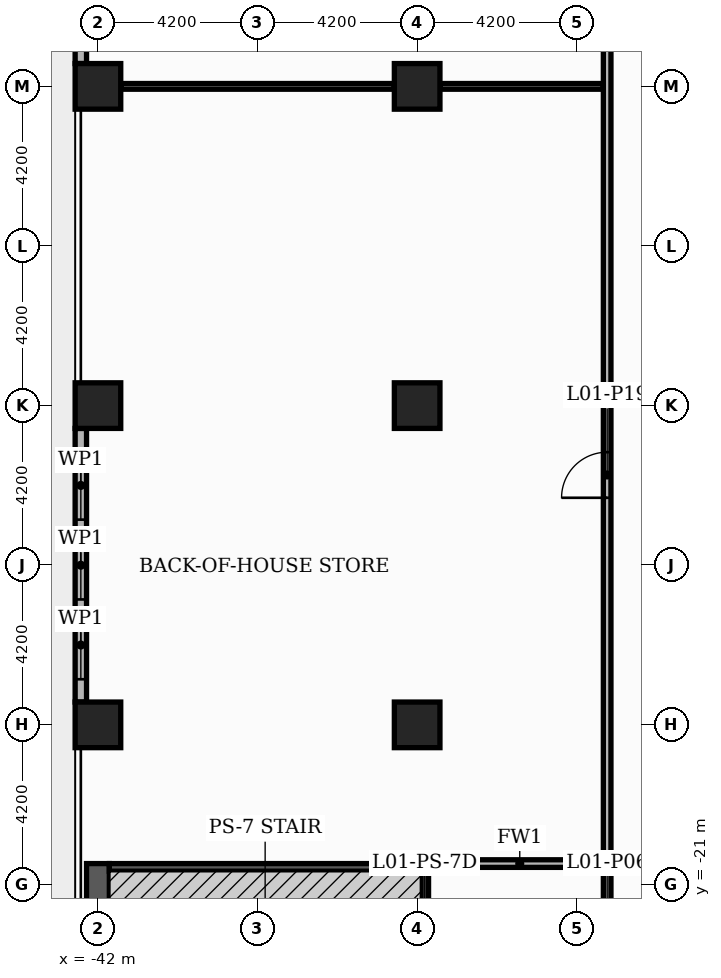
"""IFC4 building model, lengths in metres.
Left out: names, types, materials, properties, quantities, classifications, styles, units other than length and angle.
Written with IfcOpenShell. Run it as: python <this file> out.ifc"""

import sys

from ifc_helpers import new_model, si_unit, direction, frame, frame_2d, origin, origin_2d, place, context, subcontext, project, spatial, rectangle, extrude, element, fill, save


model = new_model("IFC4")
c1 = context("Model", 3, precision=1e-05, world=origin(), true_north=direction((0.0, 1.0)))
c2 = subcontext(c1, "Body", "Model", "MODEL_VIEW")
j1 = project(units=[si_unit("LENGTHUNIT", "METRE"), si_unit("PLANEANGLEUNIT", "RADIAN")], contexts=[c1])
p1 = place(None, origin())
s1 = spatial("IfcSite", under=j1, at=p1, CompositionType="ELEMENT")
p2 = place(p1, origin())
s2 = spatial("IfcBuilding", under=s1, at=p2, CompositionType="ELEMENT")
p3 = place(p2, frame((0.0, 0.0, 7.2)))
s3 = spatial("IfcBuildingStorey", under=s2, at=p3, CompositionType="ELEMENT", Elevation=7.2)
for number, where, z_axis, x_axis in (
    (1, (-33.6, 0.0, 0.0), (0.0, 0.0, 1.0), (1.0, 0.0, 0.0)),
    (2, (-33.6, -8.4, 0.0), (0.0, 0.0, 1.0), (1.0, 0.0, 0.0)),
    (3, (-33.6, -16.8, 0.0), (0.0, 0.0, 1.0), (1.0, 0.0, 0.0)),
    (4, (-42.0, 0.0, 0.0), (0.0, 0.0, 1.0), (1.0, 0.0, 0.0)),
    (5, (-42.0, -8.4, 0.0), (0.0, 0.0, 1.0), (1.0, 0.0, 0.0)),
    (6, (-42.0, -16.8, 0.0), (0.0, 0.0, 1.0), (1.0, 0.0, 0.0)),
):
    element("IfcColumn", number, at=place(p3, frame(where, z_axis=z_axis, x_axis=x_axis)), inside=s3, PredefinedType="COLUMN", context=c2, shape_type="SweptSolid", body=[
        extrude(rectangle(XDim=1.2, YDim=1.2, at=origin_2d()), origin(), (0.0, 0.0, 1.0), 4.8),
    ])
p4 = place(p3, frame((-42.45, 7.8, 0.0), z_axis=(0.0, 0.0, 1.0), x_axis=(0.0, -1.0, 0.0)))
e7 = element("IfcWall", 7, at=p4, inside=s3, PredefinedType="STANDARD", context=c2, shape_type="SweptSolid", body=[
    extrude(rectangle(XDim=7.2, YDim=0.3, at=frame_2d((3.6, 0.0))), origin(), (0.0, 0.0, 1.0), 4.38),
])
p5 = place(p4, frame((0.6, 0.0, 0.6)))
e8 = element("IfcOpeningElement", 8, at=p5, cuts=e7, PredefinedType="OPENING", context=c2, shape_type="SweptSolid", body=[
    extrude(rectangle(XDim=1.8, YDim=3.0, at=frame_2d((0.9, 1.5))), frame((0.0, 0.16, 0.0), z_axis=(0.0, -1.0, 0.0), x_axis=(1.0, 0.0, 0.0)), (0.0, 0.0, 1.0), 0.32),
])
p6 = place(p4, frame((2.7, 0.0, 0.6)))
e9 = element("IfcOpeningElement", 9, at=p6, cuts=e7, PredefinedType="OPENING", context=c2, shape_type="SweptSolid", body=[
    extrude(rectangle(XDim=1.8, YDim=3.0, at=frame_2d((0.9, 1.5))), frame((0.0, 0.16, 0.0), z_axis=(0.0, -1.0, 0.0), x_axis=(1.0, 0.0, 0.0)), (0.0, 0.0, 1.0), 0.32),
])
p7 = place(p4, frame((4.8, 0.0, 0.6)))
e10 = element("IfcOpeningElement", 10, at=p7, cuts=e7, PredefinedType="OPENING", context=c2, shape_type="SweptSolid", body=[
    extrude(rectangle(XDim=1.8, YDim=3.0, at=frame_2d((0.9, 1.5))), frame((0.0, 0.16, 0.0), z_axis=(0.0, -1.0, 0.0), x_axis=(1.0, 0.0, 0.0)), (0.0, 0.0, 1.0), 0.32),
])
p8 = place(p3, frame((-42.45, -9.0, 0.0), z_axis=(0.0, 0.0, 1.0), x_axis=(0.0, -1.0, 0.0)))
e11 = element("IfcWall", 11, at=p8, inside=s3, PredefinedType="STANDARD", context=c2, shape_type="SweptSolid", body=[
    extrude(rectangle(XDim=7.2, YDim=0.3, at=frame_2d((3.6, 0.0))), origin(), (0.0, 0.0, 1.0), 4.38),
])
p9 = place(p8, frame((0.6, 0.0, 0.6)))
e12 = element("IfcOpeningElement", 12, at=p9, cuts=e11, PredefinedType="OPENING", context=c2, shape_type="SweptSolid", body=[
    extrude(rectangle(XDim=1.8, YDim=3.0, at=frame_2d((0.9, 1.5))), frame((0.0, 0.16, 0.0), z_axis=(0.0, -1.0, 0.0), x_axis=(1.0, 0.0, 0.0)), (0.0, 0.0, 1.0), 0.32),
])
p10 = place(p8, frame((2.7, 0.0, 0.6)))
e13 = element("IfcOpeningElement", 13, at=p10, cuts=e11, PredefinedType="OPENING", context=c2, shape_type="SweptSolid", body=[
    extrude(rectangle(XDim=1.8, YDim=3.0, at=frame_2d((0.9, 1.5))), frame((0.0, 0.16, 0.0), z_axis=(0.0, -1.0, 0.0), x_axis=(1.0, 0.0, 0.0)), (0.0, 0.0, 1.0), 0.32),
])
p11 = place(p8, frame((4.8, 0.0, 0.6)))
e14 = element("IfcOpeningElement", 14, at=p11, cuts=e11, PredefinedType="OPENING", context=c2, shape_type="SweptSolid", body=[
    extrude(rectangle(XDim=1.8, YDim=3.0, at=frame_2d((0.9, 1.5))), frame((0.0, 0.16, 0.0), z_axis=(0.0, -1.0, 0.0), x_axis=(1.0, 0.0, 0.0)), (0.0, 0.0, 1.0), 0.32),
])
p12 = place(p3, frame((-33.3, -20.45, 0.0), z_axis=(0.0, 0.0, 1.0), x_axis=(1.0, 0.0, 0.0)))
e15 = element("IfcWall", 15, at=p12, inside=s3, PredefinedType="PARTITIONING", context=c2, shape_type="SweptSolid", body=[
    extrude(rectangle(XDim=4.8, YDim=0.2, at=frame_2d((2.4, 0.0))), origin(), (0.0, 0.0, 1.0), 4.38),
])
p13 = place(p3, frame((-41.4, 0.0, 0.0), z_axis=(0.0, 0.0, 1.0), x_axis=(1.0, 0.0, 0.0)))
e16 = element("IfcWall", 16, at=p13, inside=s3, PredefinedType="PARTITIONING", context=c2, shape_type="SweptSolid", body=[
    extrude(rectangle(XDim=7.2, YDim=0.15, at=frame_2d((3.6, 0.0))), origin(), (0.0, 0.0, 1.0), 4.08),
])
p14 = place(p3, frame((-33.0, 0.0, 0.0), z_axis=(0.0, 0.0, 1.0), x_axis=(1.0, 0.0, 0.0)))
e17 = element("IfcWall", 17, at=p14, inside=s3, PredefinedType="PARTITIONING", context=c2, shape_type="SweptSolid", body=[
    extrude(rectangle(XDim=4.3, YDim=0.15, at=frame_2d((2.15, 0.0))), origin(), (0.0, 0.0, 1.0), 4.08),
])
p15 = place(p3, frame((-28.6, -24.5, 0.0), z_axis=(0.0, 0.0, 1.0), x_axis=(0.0, 1.0, 0.0)))
e18 = element("IfcWall", 18, at=p15, inside=s3, PredefinedType="PARTITIONING", context=c2, shape_type="SweptSolid", body=[
    extrude(rectangle(XDim=3.95, YDim=0.2, at=frame_2d((1.975, 0.0))), origin(), (0.0, 0.0, 1.0), 4.38),
])
p16 = place(p15, frame((1.375, 0.0, 0.0)))
e19 = element("IfcOpeningElement", 19, at=p16, cuts=e18, PredefinedType="OPENING", context=c2, shape_type="SweptSolid", body=[
    extrude(rectangle(XDim=1.2, YDim=2.2, at=frame_2d((0.6, 1.1))), frame((0.0, 0.11, 0.0), z_axis=(0.0, -1.0, 0.0), x_axis=(1.0, 0.0, 0.0)), (0.0, 0.0, 1.0), 0.22),
])
p17 = place(p3, frame((-28.6, -20.35, 0.0), z_axis=(0.0, 0.0, 1.0), x_axis=(0.0, 1.0, 0.0)))
e20 = element("IfcWall", 20, at=p17, inside=s3, PredefinedType="PARTITIONING", context=c2, shape_type="SweptSolid", body=[
    extrude(rectangle(XDim=40.7, YDim=0.2, at=frame_2d((20.35, 0.0))), origin(), (0.0, 0.0, 1.0), 4.08),
])
p18 = place(p17, frame((9.525, 0.0, 0.0)))
e21 = element("IfcOpeningElement", 21, at=p18, cuts=e20, PredefinedType="OPENING", context=c2, shape_type="SweptSolid", body=[
    extrude(rectangle(XDim=1.2, YDim=2.2, at=frame_2d((0.6, 1.1))), frame((0.0, 0.11, 0.0), z_axis=(0.0, -1.0, 0.0), x_axis=(1.0, 0.0, 0.0)), (0.0, 0.0, 1.0), 0.22),
])
p19 = place(p17, frame((29.975, 0.0, 0.0)))
e22 = element("IfcOpeningElement", 22, at=p19, cuts=e20, PredefinedType="OPENING", context=c2, shape_type="SweptSolid", body=[
    extrude(rectangle(XDim=1.2, YDim=2.2, at=frame_2d((0.6, 1.1))), frame((0.0, 0.11, 0.0), z_axis=(0.0, -1.0, 0.0), x_axis=(1.0, 0.0, 0.0)), (0.0, 0.0, 1.0), 0.22),
])
p20 = place(p3, frame((-42.0, -24.6, 0.0), z_axis=(0.0, 0.0, 1.0), x_axis=(0.0, 1.0, 0.0)))
e23 = element("IfcWall", 23, at=p20, inside=s3, PredefinedType="SOLIDWALL", context=c2, shape_type="SweptSolid", body=[
    extrude(rectangle(XDim=4.15, YDim=0.6, at=frame_2d((2.075, 0.0))), origin(), (0.0, 0.0, 1.0), 3.98),
])
p21 = place(p3, frame((-33.4, -24.6, 0.0), z_axis=(0.0, 0.0, 1.0), x_axis=(0.0, 1.0, 0.0)))
e24 = element("IfcWall", 24, at=p21, inside=s3, PredefinedType="SOLIDWALL", context=c2, shape_type="SweptSolid", body=[
    extrude(rectangle(XDim=4.15, YDim=0.2, at=frame_2d((2.075, 0.0))), origin(), (0.0, 0.0, 1.0), 3.98),
])
p22 = place(p21, frame((1.175, 0.0, 0.0)))
e25 = element("IfcOpeningElement", 25, at=p22, cuts=e24, PredefinedType="OPENING", context=c2, shape_type="SweptSolid", body=[
    extrude(rectangle(XDim=1.8, YDim=2.2, at=frame_2d((0.9, 1.1))), frame((0.0, 0.11, 0.0), z_axis=(0.0, -1.0, 0.0), x_axis=(1.0, 0.0, 0.0)), (0.0, 0.0, 1.0), 0.22),
])
p23 = place(p3, frame((-41.7, -20.55, 0.0), z_axis=(0.0, 0.0, 1.0), x_axis=(1.0, 0.0, 0.0)))
e26 = element("IfcWall", 26, at=p23, inside=s3, PredefinedType="SOLIDWALL", context=c2, shape_type="SweptSolid", body=[
    extrude(rectangle(XDim=8.2, YDim=0.2, at=frame_2d((4.1, 0.0))), origin(), (0.0, 0.0, 1.0), 4.6),
])
p24 = place(p9, origin())
e27 = element("IfcWindow", 27, at=p24, inside=s3, PartitioningType="SINGLE_PANEL", PredefinedType="WINDOW", context=c2, shape_type="SweptSolid", body=[
    extrude(rectangle(XDim=1.8, YDim=3.0, at=frame_2d((0.9, 1.5))), frame((0.0, 0.03, 0.0), z_axis=(0.0, -1.0, 0.0), x_axis=(1.0, 0.0, 0.0)), (0.0, 0.0, 1.0), 0.06),
])
fill(e12, e27)
p25 = place(p10, origin())
e28 = element("IfcWindow", 28, at=p25, inside=s3, PartitioningType="SINGLE_PANEL", PredefinedType="WINDOW", context=c2, shape_type="SweptSolid", body=[
    extrude(rectangle(XDim=1.8, YDim=3.0, at=frame_2d((0.9, 1.5))), frame((0.0, 0.03, 0.0), z_axis=(0.0, -1.0, 0.0), x_axis=(1.0, 0.0, 0.0)), (0.0, 0.0, 1.0), 0.06),
])
fill(e13, e28)
p26 = place(p11, origin())
e29 = element("IfcWindow", 29, at=p26, inside=s3, PartitioningType="SINGLE_PANEL", PredefinedType="WINDOW", context=c2, shape_type="SweptSolid", body=[
    extrude(rectangle(XDim=1.8, YDim=3.0, at=frame_2d((0.9, 1.5))), frame((0.0, 0.03, 0.0), z_axis=(0.0, -1.0, 0.0), x_axis=(1.0, 0.0, 0.0)), (0.0, 0.0, 1.0), 0.06),
])
fill(e14, e29)
p27 = place(p18, origin())
e30 = element("IfcDoor", 30, at=p27, inside=s3, OperationType="SINGLE_SWING_LEFT", PredefinedType="DOOR", context=c2, shape_type="SweptSolid", body=[
    extrude(rectangle(XDim=1.2, YDim=2.2, at=frame_2d((0.6, 1.1))), frame((0.0, 0.025, 0.0), z_axis=(0.0, -1.0, 0.0), x_axis=(1.0, 0.0, 0.0)), (0.0, 0.0, 1.0), 0.05),
])
fill(e21, e30)
save(model, sys.argv[1])
